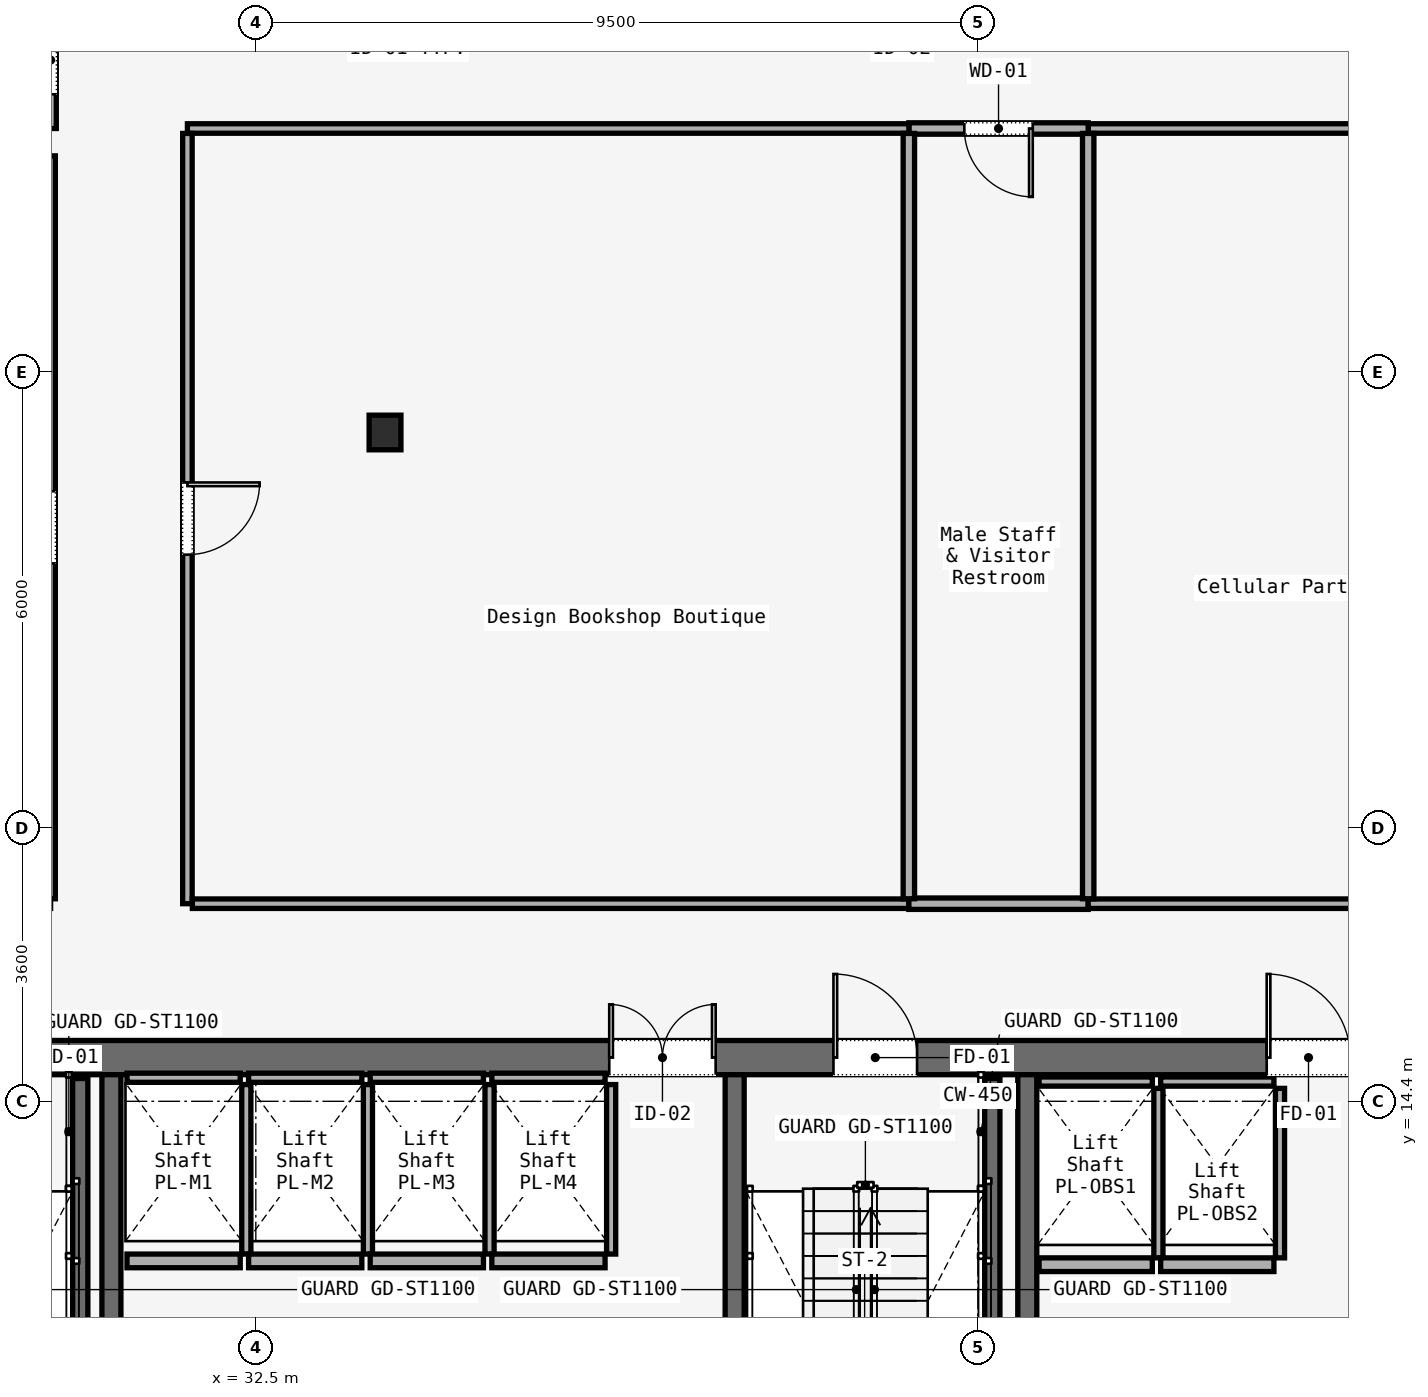
"""IFC4 building model, lengths in metres.
Left out: names, types, materials, properties, quantities, classifications, styles, units other than length and angle.
Written with IfcOpenShell. Run it as: python <this file> out.ifc"""

import sys

from ifc_helpers import new_model, si_unit, direction, frame, frame_2d, origin, origin_2d, place, context, subcontext, project, spatial, rectangle, i_section, extrude, element, fill, save


model = new_model("IFC4")
c1 = context("Model", 3, precision=1e-05, world=origin(), true_north=direction((0.0, 1.0)))
c2 = subcontext(c1, "Body", "Model", "MODEL_VIEW")
j1 = project(units=[si_unit("LENGTHUNIT", "METRE"), si_unit("PLANEANGLEUNIT", "RADIAN")], contexts=[c1])
p1 = place(None, origin())
s1 = spatial("IfcSite", under=j1, at=p1, CompositionType="ELEMENT")
p2 = place(p1, origin())
s2 = spatial("IfcBuilding", under=s1, at=p2, CompositionType="ELEMENT")
p3 = place(p2, frame((0.0, 0.0, 55.0)))
s3 = spatial("IfcBuildingStorey", under=s2, at=p3, CompositionType="ELEMENT", Elevation=55.0)
p4 = place(p3, frame((26.45, 14.975, 0.0), z_axis=(0.0, 0.0, 1.0), x_axis=(1.0, 0.0, 0.0)))
e1 = element("IfcWall", 1, at=p4, inside=s3, PredefinedType="SOLIDWALL", context=c2, shape_type="SweptSolid", body=[
    extrude(rectangle(XDim=31.1, YDim=0.45, at=frame_2d((15.55, 0.0))), origin(), (0.0, 0.0, 1.0), 3.58),
])
p5 = place(p4, frame((1.65, 0.0, 0.0)))
e2 = element("IfcOpeningElement", 2, at=p5, cuts=e1, PredefinedType="OPENING", context=c2, shape_type="SweptSolid", body=[
    extrude(rectangle(XDim=1.1, YDim=2.2, at=frame_2d((0.55, 1.1))), frame((0.0, 0.225, 0.0), z_axis=(0.0, -1.0, 0.0), x_axis=(1.0, 0.0, 0.0)), (0.0, 0.0, 1.0), 0.45),
])
p6 = place(p4, frame((13.65, 0.0, 0.0)))
e3 = element("IfcOpeningElement", 3, at=p6, cuts=e1, PredefinedType="OPENING", context=c2, shape_type="SweptSolid", body=[
    extrude(rectangle(XDim=1.1, YDim=2.2, at=frame_2d((0.55, 1.1))), frame((0.0, 0.225, 0.0), z_axis=(0.0, -1.0, 0.0), x_axis=(1.0, 0.0, 0.0)), (0.0, 0.0, 1.0), 0.45),
])
p7 = place(p4, frame((25.55, 0.0, 0.0)))
e4 = element("IfcOpeningElement", 4, at=p7, cuts=e1, PredefinedType="OPENING", context=c2, shape_type="SweptSolid", body=[
    extrude(rectangle(XDim=1.1, YDim=2.2, at=frame_2d((0.55, 1.1))), frame((0.0, 0.225, 0.0), z_axis=(0.0, -1.0, 0.0), x_axis=(1.0, 0.0, 0.0)), (0.0, 0.0, 1.0), 0.45),
])
p8 = place(p4, frame((10.7, 0.0, 0.0)))
e5 = element("IfcOpeningElement", 5, at=p8, cuts=e1, PredefinedType="OPENING", context=c2, shape_type="SweptSolid", body=[
    extrude(rectangle(XDim=1.4, YDim=2.2, at=frame_2d((0.7, 1.1))), frame((0.0, 0.225, 0.0), z_axis=(0.0, -1.0, 0.0), x_axis=(1.0, 0.0, 0.0)), (0.0, 0.0, 1.0), 0.45),
])
p9 = place(p4, frame((19.35, 0.0, 0.0)))
e6 = element("IfcOpeningElement", 6, at=p9, cuts=e1, PredefinedType="OPENING", context=c2, shape_type="SweptSolid", body=[
    extrude(rectangle(XDim=1.1, YDim=2.2, at=frame_2d((0.55, 1.1))), frame((0.0, 0.225, 0.0), z_axis=(0.0, -1.0, 0.0), x_axis=(1.0, 0.0, 0.0)), (0.0, 0.0, 1.0), 0.45),
])
p10 = place(p4, frame((21.4, 0.0, 0.0)))
e7 = element("IfcOpeningElement", 7, at=p10, cuts=e1, PredefinedType="OPENING", context=c2, shape_type="SweptSolid", body=[
    extrude(rectangle(XDim=0.9, YDim=2.1, at=frame_2d((0.45, 1.05))), frame((0.0, 0.225, 0.0), z_axis=(0.0, -1.0, 0.0), x_axis=(1.0, 0.0, 0.0)), (0.0, 0.0, 1.0), 0.45),
])
p11 = place(p4, frame((23.35, 0.0, 0.0)))
e8 = element("IfcOpeningElement", 8, at=p11, cuts=e1, PredefinedType="OPENING", context=c2, shape_type="SweptSolid", body=[
    extrude(rectangle(XDim=1.3, YDim=2.3, at=frame_2d((0.65, 1.15))), frame((0.0, 0.225, 0.0), z_axis=(0.0, -1.0, 0.0), x_axis=(1.0, 0.0, 0.0)), (0.0, 0.0, 1.0), 0.45),
])
for number, where, z_axis, x_axis in (
    (9, (30.6, 5.85, 0.0), (0.0, 0.0, 1.0), (0.0, 1.0, 0.0)),
    (10, (38.8, 5.85, 0.0), (0.0, 0.0, 1.0), (0.0, 1.0, 0.0)),
    (11, (42.65, 5.85, 0.0), (0.0, 0.0, 1.0), (0.0, 1.0, 0.0)),
):
    element("IfcWall", number, at=place(p3, frame(where, z_axis=z_axis, x_axis=x_axis)), inside=s3, PredefinedType="SOLIDWALL", context=c2, shape_type="SweptSolid", body=[
        extrude(rectangle(XDim=8.9, YDim=0.25, at=frame_2d((4.45, 0.0))), origin(), (0.0, 0.0, 1.0), 3.58),
    ])
p12 = place(p3, frame((34.2, 23.2, 0.0), z_axis=(0.0, 0.0, 1.0), x_axis=(1.0, 0.0, 0.0)))
e12 = element("IfcColumn", 12, at=p12, inside=s3, PredefinedType="COLUMN", context=c2, shape_type="SweptSolid", body=[
    extrude(i_section(OverallWidth=0.418, OverallDepth=0.456, WebThickness=0.042, FlangeThickness=0.067, FilletRadius=0.015, at=origin_2d()), origin(), (0.0, 0.0, 1.0), 3.58),
])
for number, where, z_axis, x_axis in (
    (13, (30.19, 14.7, 0.0), (0.0, 0.0, 1.0), (0.0, -1.0, 0.0)),
    (14, (42.19, 14.7, 0.0), (0.0, 0.0, 1.0), (0.0, -1.0, 0.0)),
):
    element("IfcWall", number, at=place(p3, frame(where, z_axis=z_axis, x_axis=x_axis)), inside=s3, PredefinedType="SOLIDWALL", context=c2, shape_type="SweptSolid", body=[
        extrude(rectangle(XDim=7.65, YDim=0.2, at=frame_2d((3.825, 0.0))), origin(), (0.0, 0.0, 1.0), 3.8),
    ])
p13 = place(p3, frame((30.805, 12.3, 0.0), z_axis=(0.0, 0.0, 1.0), x_axis=(1.0, 0.0, 0.0)))
e15 = element("IfcWall", 15, at=p13, inside=s3, PredefinedType="SOLIDWALL", context=c2, shape_type="SweptSolid", body=[
    extrude(rectangle(XDim=1.49, YDim=0.18, at=frame_2d((0.745, 0.0))), origin(), (0.0, 0.0, 1.0), 2.933),
])
p14 = place(p3, frame((30.805, 14.71, 0.0), z_axis=(0.0, 0.0, 1.0), x_axis=(1.0, 0.0, 0.0)))
e16 = element("IfcWall", 16, at=p14, inside=s3, PredefinedType="SOLIDWALL", context=c2, shape_type="SweptSolid", body=[
    extrude(rectangle(XDim=1.49, YDim=0.12, at=frame_2d((0.745, 0.0))), origin(), (0.0, 0.0, 1.0), 2.933),
])
p15 = place(p3, frame((32.375, 12.39, 0.0), z_axis=(0.0, 0.0, 1.0), x_axis=(0.0, 1.0, 0.0)))
e17 = element("IfcWall", 17, at=p15, inside=s3, PredefinedType="SOLIDWALL", context=c2, shape_type="SweptSolid", body=[
    extrude(rectangle(XDim=2.23, YDim=0.12, at=frame_2d((1.115, 0.0))), origin(), (0.0, 0.0, 1.0), 2.933),
])
p16 = place(p3, frame((32.405, 12.3, 0.0), z_axis=(0.0, 0.0, 1.0), x_axis=(1.0, 0.0, 0.0)))
e18 = element("IfcWall", 18, at=p16, inside=s3, PredefinedType="SOLIDWALL", context=c2, shape_type="SweptSolid", body=[
    extrude(rectangle(XDim=1.49, YDim=0.18, at=frame_2d((0.745, 0.0))), origin(), (0.0, 0.0, 1.0), 2.933),
])
p17 = place(p3, frame((32.405, 14.71, 0.0), z_axis=(0.0, 0.0, 1.0), x_axis=(1.0, 0.0, 0.0)))
e19 = element("IfcWall", 19, at=p17, inside=s3, PredefinedType="SOLIDWALL", context=c2, shape_type="SweptSolid", body=[
    extrude(rectangle(XDim=1.49, YDim=0.12, at=frame_2d((0.745, 0.0))), origin(), (0.0, 0.0, 1.0), 2.933),
])
p18 = place(p3, frame((33.975, 12.39, 0.0), z_axis=(0.0, 0.0, 1.0), x_axis=(0.0, 1.0, 0.0)))
e20 = element("IfcWall", 20, at=p18, inside=s3, PredefinedType="SOLIDWALL", context=c2, shape_type="SweptSolid", body=[
    extrude(rectangle(XDim=2.23, YDim=0.12, at=frame_2d((1.115, 0.0))), origin(), (0.0, 0.0, 1.0), 2.933),
])
p19 = place(p3, frame((34.005, 12.3, 0.0), z_axis=(0.0, 0.0, 1.0), x_axis=(1.0, 0.0, 0.0)))
e21 = element("IfcWall", 21, at=p19, inside=s3, PredefinedType="SOLIDWALL", context=c2, shape_type="SweptSolid", body=[
    extrude(rectangle(XDim=1.49, YDim=0.18, at=frame_2d((0.745, 0.0))), origin(), (0.0, 0.0, 1.0), 2.933),
])
p20 = place(p3, frame((34.005, 14.71, 0.0), z_axis=(0.0, 0.0, 1.0), x_axis=(1.0, 0.0, 0.0)))
e22 = element("IfcWall", 22, at=p20, inside=s3, PredefinedType="SOLIDWALL", context=c2, shape_type="SweptSolid", body=[
    extrude(rectangle(XDim=1.49, YDim=0.12, at=frame_2d((0.745, 0.0))), origin(), (0.0, 0.0, 1.0), 2.933),
])
p21 = place(p3, frame((35.575, 12.39, 0.0), z_axis=(0.0, 0.0, 1.0), x_axis=(0.0, 1.0, 0.0)))
e23 = element("IfcWall", 23, at=p21, inside=s3, PredefinedType="SOLIDWALL", context=c2, shape_type="SweptSolid", body=[
    extrude(rectangle(XDim=2.23, YDim=0.12, at=frame_2d((1.115, 0.0))), origin(), (0.0, 0.0, 1.0), 2.933),
])
p22 = place(p3, frame((35.605, 12.3, 0.0), z_axis=(0.0, 0.0, 1.0), x_axis=(1.0, 0.0, 0.0)))
e24 = element("IfcWall", 24, at=p22, inside=s3, PredefinedType="SOLIDWALL", context=c2, shape_type="SweptSolid", body=[
    extrude(rectangle(XDim=1.49, YDim=0.18, at=frame_2d((0.745, 0.0))), origin(), (0.0, 0.0, 1.0), 2.933),
])
p23 = place(p3, frame((35.605, 14.71, 0.0), z_axis=(0.0, 0.0, 1.0), x_axis=(1.0, 0.0, 0.0)))
e25 = element("IfcWall", 25, at=p23, inside=s3, PredefinedType="SOLIDWALL", context=c2, shape_type="SweptSolid", body=[
    extrude(rectangle(XDim=1.49, YDim=0.12, at=frame_2d((0.745, 0.0))), origin(), (0.0, 0.0, 1.0), 2.933),
])
p24 = place(p3, frame((37.175, 12.39, 0.0), z_axis=(0.0, 0.0, 1.0), x_axis=(0.0, 1.0, 0.0)))
e26 = element("IfcWall", 26, at=p24, inside=s3, PredefinedType="SOLIDWALL", context=c2, shape_type="SweptSolid", body=[
    extrude(rectangle(XDim=2.23, YDim=0.12, at=frame_2d((1.115, 0.0))), origin(), (0.0, 0.0, 1.0), 2.933),
])
p25 = place(p3, frame((42.805, 12.25, 0.0), z_axis=(0.0, 0.0, 1.0), x_axis=(1.0, 0.0, 0.0)))
e27 = element("IfcWall", 27, at=p25, inside=s3, PredefinedType="SOLIDWALL", context=c2, shape_type="SweptSolid", body=[
    extrude(rectangle(XDim=1.49, YDim=0.18, at=frame_2d((0.745, 0.0))), origin(), (0.0, 0.0, 1.0), 2.933),
])
p26 = place(p3, frame((42.805, 14.66, 0.0), z_axis=(0.0, 0.0, 1.0), x_axis=(1.0, 0.0, 0.0)))
e28 = element("IfcWall", 28, at=p26, inside=s3, PredefinedType="SOLIDWALL", context=c2, shape_type="SweptSolid", body=[
    extrude(rectangle(XDim=1.49, YDim=0.12, at=frame_2d((0.745, 0.0))), origin(), (0.0, 0.0, 1.0), 2.933),
])
p27 = place(p3, frame((44.375, 12.34, 0.0), z_axis=(0.0, 0.0, 1.0), x_axis=(0.0, 1.0, 0.0)))
e29 = element("IfcWall", 29, at=p27, inside=s3, PredefinedType="SOLIDWALL", context=c2, shape_type="SweptSolid", body=[
    extrude(rectangle(XDim=2.23, YDim=0.12, at=frame_2d((1.115, 0.0))), origin(), (0.0, 0.0, 1.0), 2.933),
])
p28 = place(p3, frame((44.405, 12.25, 0.0), z_axis=(0.0, 0.0, 1.0), x_axis=(1.0, 0.0, 0.0)))
e30 = element("IfcWall", 30, at=p28, inside=s3, PredefinedType="SOLIDWALL", context=c2, shape_type="SweptSolid", body=[
    extrude(rectangle(XDim=1.49, YDim=0.18, at=frame_2d((0.745, 0.0))), origin(), (0.0, 0.0, 1.0), 2.933),
])
p29 = place(p3, frame((44.405, 14.66, 0.0), z_axis=(0.0, 0.0, 1.0), x_axis=(1.0, 0.0, 0.0)))
e31 = element("IfcWall", 31, at=p29, inside=s3, PredefinedType="SOLIDWALL", context=c2, shape_type="SweptSolid", body=[
    extrude(rectangle(XDim=1.49, YDim=0.12, at=frame_2d((0.745, 0.0))), origin(), (0.0, 0.0, 1.0), 2.933),
])
p30 = place(p3, frame((45.975, 12.34, 0.0), z_axis=(0.0, 0.0, 1.0), x_axis=(0.0, 1.0, 0.0)))
e32 = element("IfcWall", 32, at=p30, inside=s3, PredefinedType="SOLIDWALL", context=c2, shape_type="SweptSolid", body=[
    extrude(rectangle(XDim=2.23, YDim=0.12, at=frame_2d((1.115, 0.0))), origin(), (0.0, 0.0, 1.0), 2.933),
])
p31 = place(p3, frame((29.8, 17.065, 0.0), z_axis=(0.0, 0.0, 1.0), x_axis=(0.0, 1.0, 0.0)))
e33 = element("IfcWall", 33, at=p31, inside=s3, PredefinedType="PARTITIONING", context=c2, shape_type="SweptSolid", body=[
    extrude(rectangle(XDim=9.775, YDim=0.125, at=frame_2d((4.888, 0.0))), origin(), (0.0, 0.0, 1.0), 2.933),
])
p32 = place(p31, frame((4.413, 0.0, 0.0)))
e34 = element("IfcOpeningElement", 34, at=p32, cuts=e33, PredefinedType="OPENING", context=c2, shape_type="SweptSolid", body=[
    extrude(rectangle(XDim=0.95, YDim=2.2, at=frame_2d((0.475, 1.1))), frame((0.0, 0.062, 0.0), z_axis=(0.0, -1.0, 0.0), x_axis=(1.0, 0.0, 0.0)), (0.0, 0.0, 1.0), 0.125),
])
p33 = place(p3, frame((29.8, 27.2, 0.0), z_axis=(0.0, 0.0, 1.0), x_axis=(0.0, 1.0, 0.0)))
e35 = element("IfcWall", 35, at=p33, inside=s3, PredefinedType="PARTITIONING", context=c2, shape_type="SweptSolid", body=[
    extrude(rectangle(XDim=1.8, YDim=0.15, at=frame_2d((0.9, 0.0))), origin(), (0.0, 0.0, 1.0), 2.933),
])
p34 = place(p33, frame((0.45, 0.0, 0.0)))
e36 = element("IfcOpeningElement", 36, at=p34, cuts=e35, PredefinedType="OPENING", context=c2, shape_type="SweptSolid", body=[
    extrude(rectangle(XDim=0.9, YDim=2.15, at=frame_2d((0.45, 1.075))), frame((0.0, 0.075, 0.0), z_axis=(0.0, -1.0, 0.0), x_axis=(1.0, 0.0, 0.0)), (0.0, 0.0, 1.0), 0.15),
])
p35 = place(p3, frame((54.135, 27.2, 0.0), z_axis=(0.0, 0.0, 1.0), x_axis=(-1.0, 0.0, 0.0)))
e37 = element("IfcWall", 37, at=p35, inside=s3, PredefinedType="PARTITIONING", context=c2, shape_type="SweptSolid", body=[
    extrude(rectangle(XDim=10.684, YDim=0.125, at=frame_2d((5.342, 0.0))), origin(), (0.0, 0.0, 1.0), 2.933),
])
p36 = place(p3, frame((43.451, 27.2, 0.0), z_axis=(0.0, 0.0, 1.0), x_axis=(-1.0, 0.0, 0.0)))
e38 = element("IfcWall", 38, at=p36, inside=s3, PredefinedType="PARTITIONING", context=c2, shape_type="SweptSolid", body=[
    extrude(rectangle(XDim=2.359, YDim=0.15, at=frame_2d((1.18, 0.0))), origin(), (0.0, 0.0, 1.0), 2.933),
])
p37 = place(p36, frame((0.73, 0.0, 0.0)))
e39 = element("IfcOpeningElement", 39, at=p37, cuts=e38, PredefinedType="OPENING", context=c2, shape_type="SweptSolid", body=[
    extrude(rectangle(XDim=0.9, YDim=2.15, at=frame_2d((0.45, 1.075))), frame((0.0, 0.075, 0.0), z_axis=(0.0, -1.0, 0.0), x_axis=(1.0, 0.0, 0.0)), (0.0, 0.0, 1.0), 0.15),
])
p38 = place(p3, frame((41.092, 27.2, 0.0), z_axis=(0.0, 0.0, 1.0), x_axis=(-1.0, 0.0, 0.0)))
e40 = element("IfcWall", 40, at=p38, inside=s3, PredefinedType="PARTITIONING", context=c2, shape_type="SweptSolid", body=[
    extrude(rectangle(XDim=9.492, YDim=0.125, at=frame_2d((4.746, 0.0))), origin(), (0.0, 0.0, 1.0), 2.933),
])
p39 = place(p3, frame((31.6, 27.135, 0.0), z_axis=(0.0, 0.0, 1.0), x_axis=(0.0, -1.0, 0.0)))
e41 = element("IfcWall", 41, at=p39, inside=s3, PredefinedType="PARTITIONING", context=c2, shape_type="SweptSolid", body=[
    extrude(rectangle(XDim=10.135, YDim=0.125, at=frame_2d((5.067, 0.0))), origin(), (0.0, 0.0, 1.0), 2.933),
])
p40 = place(p39, frame((4.593, 0.0, 0.0)))
e42 = element("IfcOpeningElement", 42, at=p40, cuts=e41, PredefinedType="OPENING", context=c2, shape_type="SweptSolid", body=[
    extrude(rectangle(XDim=0.95, YDim=2.2, at=frame_2d((0.475, 1.1))), frame((0.0, 0.062, 0.0), z_axis=(0.0, -1.0, 0.0), x_axis=(1.0, 0.0, 0.0)), (0.0, 0.0, 1.0), 0.125),
])
p41 = place(p3, frame((31.665, 17.0, 0.0), z_axis=(0.0, 0.0, 1.0), x_axis=(1.0, 0.0, 0.0)))
e43 = element("IfcWall", 43, at=p41, inside=s3, PredefinedType="PARTITIONING", context=c2, shape_type="SweptSolid", body=[
    extrude(rectangle(XDim=9.427, YDim=0.125, at=frame_2d((4.713, 0.0))), origin(), (0.0, 0.0, 1.0), 2.933),
])
p42 = place(p3, frame((41.092, 17.0, 0.0), z_axis=(0.0, 0.0, 1.0), x_axis=(1.0, 0.0, 0.0)))
e44 = element("IfcWall", 44, at=p42, inside=s3, PredefinedType="PARTITIONING", context=c2, shape_type="SweptSolid", body=[
    extrude(rectangle(XDim=2.359, YDim=0.15, at=frame_2d((1.18, 0.0))), origin(), (0.0, 0.0, 1.0), 2.933),
])
p43 = place(p3, frame((43.451, 17.0, 0.0), z_axis=(0.0, 0.0, 1.0), x_axis=(1.0, 0.0, 0.0)))
e45 = element("IfcWall", 45, at=p43, inside=s3, PredefinedType="PARTITIONING", context=c2, shape_type="SweptSolid", body=[
    extrude(rectangle(XDim=10.749, YDim=0.125, at=frame_2d((5.374, 0.0))), origin(), (0.0, 0.0, 1.0), 2.933),
])
p44 = place(p43, frame((4.899, 0.0, 0.0)))
e46 = element("IfcOpeningElement", 46, at=p44, cuts=e45, PredefinedType="OPENING", context=c2, shape_type="SweptSolid", body=[
    extrude(rectangle(XDim=0.95, YDim=2.2, at=frame_2d((0.475, 1.1))), frame((0.0, 0.062, 0.0), z_axis=(0.0, -1.0, 0.0), x_axis=(1.0, 0.0, 0.0)), (0.0, 0.0, 1.0), 0.125),
])
for number, where, z_axis, x_axis in (
    (47, (41.092, 27.135, 0.0), (0.0, 0.0, 1.0), (0.0, -1.0, 0.0)),
    (48, (43.451, 27.135, 0.0), (0.0, 0.0, 1.0), (0.0, -1.0, 0.0)),
):
    element("IfcWall", number, at=place(p3, frame(where, z_axis=z_axis, x_axis=x_axis)), inside=s3, PredefinedType="PARTITIONING", context=c2, shape_type="SweptSolid", body=[
        extrude(rectangle(XDim=10.07, YDim=0.15, at=frame_2d((5.035, 0.0))), origin(), (0.0, 0.0, 1.0), 2.933),
    ])
p45 = place(p6, origin())
e49 = element("IfcDoor", 49, at=p45, inside=s3, OperationType="SINGLE_SWING_LEFT", PredefinedType="DOOR", context=c2, shape_type="SweptSolid", body=[
    extrude(rectangle(XDim=1.1, YDim=2.2, at=frame_2d((0.55, 1.1))), frame((0.0, 0.025, 0.0), z_axis=(0.0, -1.0, 0.0), x_axis=(1.0, 0.0, 0.0)), (0.0, 0.0, 1.0), 0.05),
])
fill(e3, e49)
p46 = place(p8, origin())
e50 = element("IfcDoor", 50, at=p46, inside=s3, OperationType="DOUBLE_DOOR_SINGLE_SWING", PredefinedType="DOOR", context=c2, shape_type="SweptSolid", body=[
    extrude(rectangle(XDim=1.4, YDim=2.2, at=frame_2d((0.7, 1.1))), frame((0.0, 0.025, 0.0), z_axis=(0.0, -1.0, 0.0), x_axis=(1.0, 0.0, 0.0)), (0.0, 0.0, 1.0), 0.05),
])
fill(e5, e50)
p47 = place(p9, origin())
e51 = element("IfcDoor", 51, at=p47, inside=s3, OperationType="SINGLE_SWING_LEFT", PredefinedType="DOOR", context=c2, shape_type="SweptSolid", body=[
    extrude(rectangle(XDim=1.1, YDim=2.2, at=frame_2d((0.55, 1.1))), frame((0.0, 0.025, 0.0), z_axis=(0.0, -1.0, 0.0), x_axis=(1.0, 0.0, 0.0)), (0.0, 0.0, 1.0), 0.05),
])
fill(e6, e51)
p48 = place(p32, origin())
e52 = element("IfcDoor", 52, at=p48, inside=s3, OperationType="SINGLE_SWING_RIGHT", PredefinedType="DOOR", context=c2, shape_type="SweptSolid", body=[
    extrude(rectangle(XDim=0.95, YDim=2.2, at=frame_2d((0.475, 1.1))), frame((0.0, 0.025, 0.0), z_axis=(0.0, -1.0, 0.0), x_axis=(1.0, 0.0, 0.0)), (0.0, 0.0, 1.0), 0.05),
])
fill(e34, e52)
p49 = place(p40, origin())
e53 = element("IfcDoor", 53, at=p49, inside=s3, OperationType="SINGLE_SWING_LEFT", PredefinedType="DOOR", context=c2, shape_type="SweptSolid", body=[
    extrude(rectangle(XDim=0.95, YDim=2.2, at=frame_2d((0.475, 1.1))), frame((0.0, 0.025, 0.0), z_axis=(0.0, -1.0, 0.0), x_axis=(1.0, 0.0, 0.0)), (0.0, 0.0, 1.0), 0.05),
])
fill(e42, e53)
p50 = place(p37, origin())
e54 = element("IfcDoor", 54, at=p50, inside=s3, OperationType="SINGLE_SWING_RIGHT", PredefinedType="DOOR", context=c2, shape_type="SweptSolid", body=[
    extrude(rectangle(XDim=0.9, YDim=2.15, at=frame_2d((0.45, 1.075))), frame((0.0, 0.025, 0.0), z_axis=(0.0, -1.0, 0.0), x_axis=(1.0, 0.0, 0.0)), (0.0, 0.0, 1.0), 0.05),
])
fill(e39, e54)
p51 = place(p34, origin())
e55 = element("IfcDoor", 55, at=p51, inside=s3, OperationType="SINGLE_SWING_LEFT", PredefinedType="DOOR", context=c2, shape_type="SweptSolid", body=[
    extrude(rectangle(XDim=0.9, YDim=2.15, at=frame_2d((0.45, 1.075))), frame((0.0, 0.025, 0.0), z_axis=(0.0, -1.0, 0.0), x_axis=(1.0, 0.0, 0.0)), (0.0, 0.0, 1.0), 0.05),
])
fill(e36, e55)
save(model, sys.argv[1])
